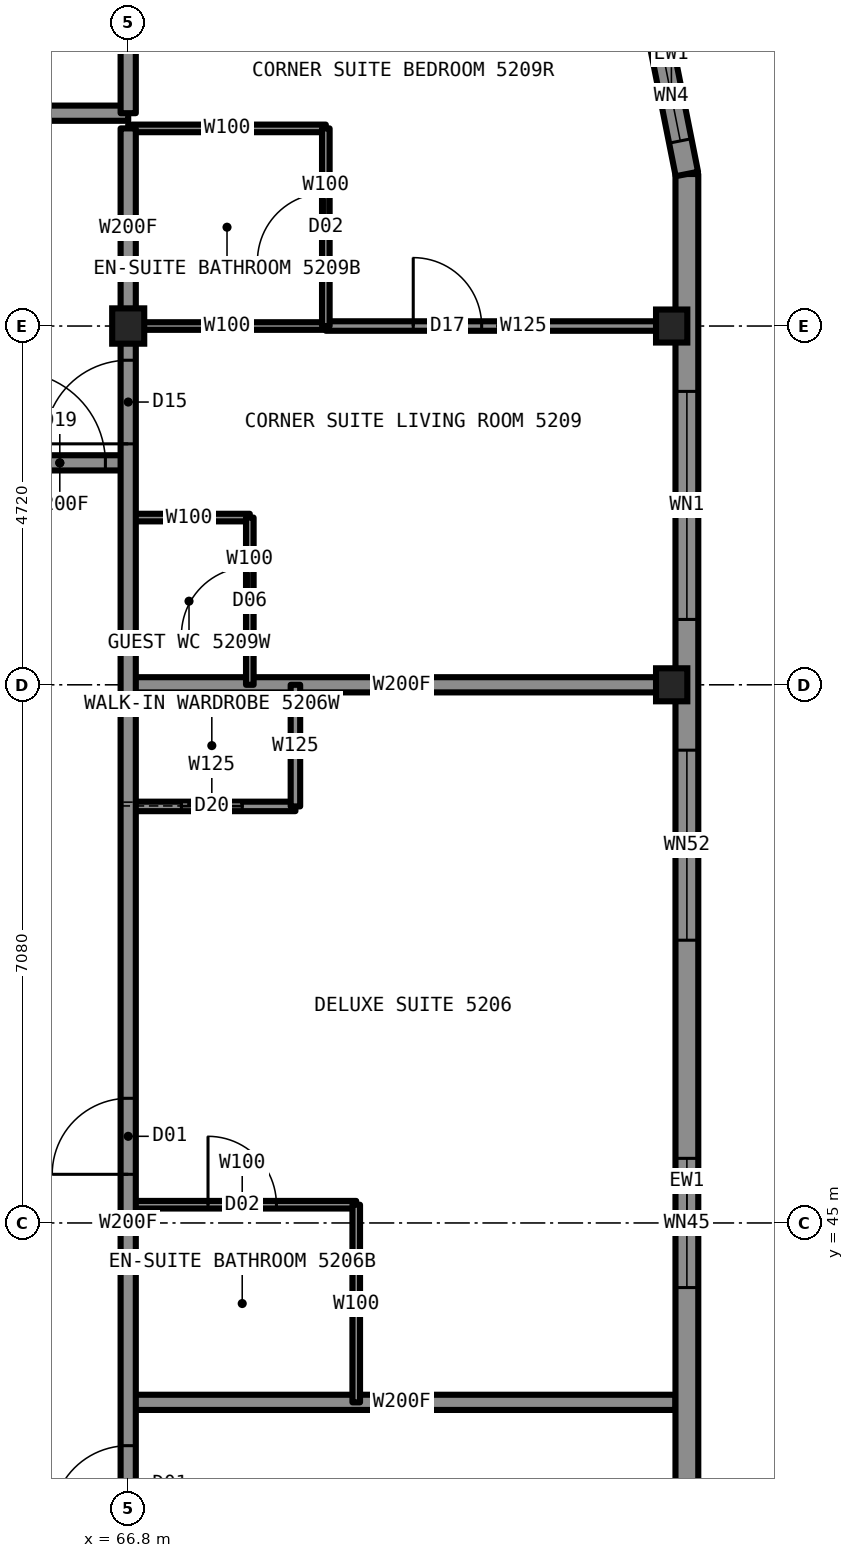
"""IFC4 building model, lengths in metres.
Left out: names, types, materials, properties, quantities, classifications, styles, units other than length and angle.
Written with IfcOpenShell. Run it as: python <this file> out.ifc"""

import sys

from ifc_helpers import new_model, si_unit, direction, frame, frame_2d, origin, origin_2d, place, context, subcontext, project, spatial, rectangle, i_section, extrude, element, fill, save


model = new_model("IFC4")
c1 = context("Model", 3, precision=1e-05, world=origin(), true_north=direction((0.0, 1.0)))
c2 = subcontext(c1, "Body", "Model", "MODEL_VIEW")
j1 = project(units=[si_unit("LENGTHUNIT", "METRE"), si_unit("PLANEANGLEUNIT", "RADIAN")], contexts=[c1])
p1 = place(None, origin())
s1 = spatial("IfcSite", under=j1, at=p1, CompositionType="ELEMENT")
p2 = place(p1, origin())
s2 = spatial("IfcBuilding", under=s1, at=p2, CompositionType="ELEMENT")
p3 = place(p2, frame((0.0, 0.0, 193.3)))
s3 = spatial("IfcBuildingStorey", under=s2, at=p3, CompositionType="ELEMENT", Elevation=193.3)
for number, where, z_axis, x_axis in (
    (1, (73.95, 52.08, 0.0), (0.0, 0.0, 1.0), (1.0, 0.0, 0.0)),
    (2, (73.95, 56.8, 0.0), (0.0, 0.0, 1.0), (1.0, 0.0, 0.0)),
):
    element("IfcColumn", number, at=place(p3, frame(where, z_axis=z_axis, x_axis=x_axis)), inside=s3, PredefinedType="COLUMN", context=c2, shape_type="SweptSolid", body=[
        extrude(i_section(OverallWidth=0.411, OverallDepth=0.434, WebThickness=0.036, FlangeThickness=0.057, at=origin_2d()), origin(), (0.0, 0.0, 1.0), 3.5),
    ])
p4 = place(p3, frame((66.8, 56.8, 0.0), z_axis=(0.0, 0.0, 1.0), x_axis=(1.0, 0.0, 0.0)))
e3 = element("IfcColumn", 3, at=p4, inside=s3, PredefinedType="COLUMN", context=c2, shape_type="SweptSolid", body=[
    extrude(i_section(OverallWidth=0.422, OverallDepth=0.465, WebThickness=0.045, FlangeThickness=0.073, at=origin_2d()), origin(), (0.0, 0.0, 1.0), 3.5),
])
p5 = place(p3, frame((66.8, 42.64, 0.0), z_axis=(0.0, 0.0, 1.0), x_axis=(1.0, 0.0, 0.0)))
e4 = element("IfcWall", 4, at=p5, inside=s3, PredefinedType="PARTITIONING", context=c2, shape_type="SweptSolid", body=[
    extrude(rectangle(XDim=7.2, YDim=0.2, at=frame_2d((3.6, 0.0))), origin(), (0.0, 0.0, 1.0), 2.73),
])
p6 = place(p3, frame((66.8, 45.24, 0.0), z_axis=(0.0, 0.0, 1.0), x_axis=(1.0, 0.0, 0.0)))
e5 = element("IfcWall", 5, at=p6, inside=s3, PredefinedType="PARTITIONING", context=c2, shape_type="SweptSolid", body=[
    extrude(rectangle(XDim=3.0, YDim=0.1, at=frame_2d((1.5, 0.0))), origin(), (0.0, 0.0, 1.0), 3.33),
])
p7 = place(p6, frame((1.05, 0.0, 0.0)))
e6 = element("IfcOpeningElement", 6, at=p7, cuts=e5, PredefinedType="OPENING", context=c2, shape_type="SweptSolid", body=[
    extrude(rectangle(XDim=0.9, YDim=2.1, at=frame_2d((0.45, 1.05))), frame((0.0, 0.06, 0.0), z_axis=(0.0, -1.0, 0.0), x_axis=(1.0, 0.0, 0.0)), (0.0, 0.0, 1.0), 0.12),
])
p8 = place(p3, frame((65.0, 55.0, 0.0), z_axis=(0.0, 0.0, 1.0), x_axis=(1.0, 0.0, 0.0)))
e7 = element("IfcWall", 7, at=p8, inside=s3, PredefinedType="PARTITIONING", context=c2, shape_type="SweptSolid", body=[
    extrude(rectangle(XDim=1.8, YDim=0.2, at=frame_2d((0.9, 0.0))), origin(), (0.0, 0.0, 1.0), 3.33),
])
p9 = place(p8, frame((0.3, 0.0, 0.0)))
e8 = element("IfcOpeningElement", 8, at=p9, cuts=e7, PredefinedType="OPENING", context=c2, shape_type="SweptSolid", body=[
    extrude(rectangle(XDim=1.2, YDim=2.2, at=frame_2d((0.6, 1.1))), frame((0.0, 0.11, 0.0), z_axis=(0.0, -1.0, 0.0), x_axis=(1.0, 0.0, 0.0)), (0.0, 0.0, 1.0), 0.22),
])
p10 = place(p3, frame((66.8, 56.8, 0.0), z_axis=(0.0, 0.0, 1.0), x_axis=(1.0, 0.0, 0.0)))
e9 = element("IfcWall", 9, at=p10, inside=s3, PredefinedType="PARTITIONING", context=c2, shape_type="SweptSolid", body=[
    extrude(rectangle(XDim=2.6, YDim=0.1, at=frame_2d((1.3, 0.0))), origin(), (0.0, 0.0, 1.0), 2.573),
])
p11 = place(p3, frame((69.4, 56.8, 0.0), z_axis=(0.0, 0.0, 1.0), x_axis=(1.0, 0.0, 0.0)))
e10 = element("IfcWall", 10, at=p11, inside=s3, PredefinedType="PARTITIONING", context=c2, shape_type="SweptSolid", body=[
    extrude(rectangle(XDim=4.6, YDim=0.125, at=frame_2d((2.3, 0.0))), origin(), (0.0, 0.0, 1.0), 2.573),
])
p12 = place(p11, frame((1.15, 0.0, 0.0)))
e11 = element("IfcOpeningElement", 11, at=p12, cuts=e10, PredefinedType="OPENING", context=c2, shape_type="SweptSolid", body=[
    extrude(rectangle(XDim=0.9, YDim=2.2, at=frame_2d((0.45, 1.1))), frame((0.0, 0.073, 0.0), z_axis=(0.0, -1.0, 0.0), x_axis=(1.0, 0.0, 0.0)), (0.0, 0.0, 1.0), 0.145),
])
p13 = place(p3, frame((66.8, 59.4, 0.0), z_axis=(0.0, 0.0, 1.0), x_axis=(1.0, 0.0, 0.0)))
e12 = element("IfcWall", 12, at=p13, inside=s3, PredefinedType="PARTITIONING", context=c2, shape_type="SweptSolid", body=[
    extrude(rectangle(XDim=2.6, YDim=0.1, at=frame_2d((1.3, 0.0))), origin(), (0.0, 0.0, 1.0), 3.33),
])
p14 = place(p3, frame((43.2, 59.6, 0.0), z_axis=(0.0, 0.0, 1.0), x_axis=(1.0, 0.0, 0.0)))
e13 = element("IfcWall", 13, at=p14, inside=s3, PredefinedType="PARTITIONING", context=c2, shape_type="SweptSolid", body=[
    extrude(rectangle(XDim=23.6, YDim=0.2, at=frame_2d((11.8, 0.0))), origin(), (0.0, 0.0, 1.0), 3.33),
])
p15 = place(p14, frame((3.0, 0.0, 0.0)))
e14 = element("IfcOpeningElement", 14, at=p15, cuts=e13, PredefinedType="OPENING", context=c2, shape_type="SweptSolid", body=[
    extrude(rectangle(XDim=1.0, YDim=2.2, at=frame_2d((0.5, 1.1))), frame((0.0, 0.11, 0.0), z_axis=(0.0, -1.0, 0.0), x_axis=(1.0, 0.0, 0.0)), (0.0, 0.0, 1.0), 0.22),
])
p16 = place(p14, frame((11.29, 0.0, 0.0)))
e15 = element("IfcOpeningElement", 15, at=p16, cuts=e13, PredefinedType="OPENING", context=c2, shape_type="SweptSolid", body=[
    extrude(rectangle(XDim=1.1, YDim=2.2, at=frame_2d((0.55, 1.1))), frame((0.0, 0.11, 0.0), z_axis=(0.0, -1.0, 0.0), x_axis=(1.0, 0.0, 0.0)), (0.0, 0.0, 1.0), 0.22),
])
p17 = place(p3, frame((66.8, 50.48, 0.0), z_axis=(0.0, 0.0, 1.0), x_axis=(1.0, 0.0, 0.0)))
e16 = element("IfcWall", 16, at=p17, inside=s3, PredefinedType="PARTITIONING", context=c2, shape_type="SweptSolid", body=[
    extrude(rectangle(XDim=2.2, YDim=0.125, at=frame_2d((1.1, 0.0))), origin(), (0.0, 0.0, 1.0), 3.33),
])
p18 = place(p17, frame((0.7, 0.0, 0.0)))
e17 = element("IfcOpeningElement", 17, at=p18, cuts=e16, PredefinedType="OPENING", context=c2, shape_type="SweptSolid", body=[
    extrude(rectangle(XDim=0.8, YDim=2.1, at=frame_2d((0.4, 1.05))), frame((0.0, 0.073, 0.0), z_axis=(0.0, -1.0, 0.0), x_axis=(1.0, 0.0, 0.0)), (0.0, 0.0, 1.0), 0.145),
])
p19 = place(p3, frame((66.8, 52.08, 0.0), z_axis=(0.0, 0.0, 1.0), x_axis=(1.0, 0.0, 0.0)))
e18 = element("IfcWall", 18, at=p19, inside=s3, PredefinedType="PARTITIONING", context=c2, shape_type="SweptSolid", body=[
    extrude(rectangle(XDim=7.2, YDim=0.2, at=frame_2d((3.6, 0.0))), origin(), (0.0, 0.0, 1.0), 2.573),
])
p20 = place(p3, frame((66.8, 54.28, 0.0), z_axis=(0.0, 0.0, 1.0), x_axis=(1.0, 0.0, 0.0)))
e19 = element("IfcWall", 19, at=p20, inside=s3, PredefinedType="PARTITIONING", context=c2, shape_type="SweptSolid", body=[
    extrude(rectangle(XDim=1.6, YDim=0.1, at=frame_2d((0.8, 0.0))), origin(), (0.0, 0.0, 1.0), 3.33),
])
p21 = place(p3, frame((66.8, 33.22, 0.0), z_axis=(0.0, 0.0, 1.0), x_axis=(0.0, 1.0, 0.0)))
e20 = element("IfcWall", 20, at=p21, inside=s3, PredefinedType="PARTITIONING", context=c2, shape_type="SweptSolid", body=[
    extrude(rectangle(XDim=23.56, YDim=0.2, at=frame_2d((11.78, 0.0))), origin(), (0.0, 0.0, 1.0), 3.33),
])
p22 = place(p21, frame((7.85, 0.0, 0.0)))
e21 = element("IfcOpeningElement", 21, at=p22, cuts=e20, PredefinedType="OPENING", context=c2, shape_type="SweptSolid", body=[
    extrude(rectangle(XDim=1.0, YDim=2.2, at=frame_2d((0.5, 1.1))), frame((0.0, 0.11, 0.0), z_axis=(0.0, -1.0, 0.0), x_axis=(1.0, 0.0, 0.0)), (0.0, 0.0, 1.0), 0.22),
])
p23 = place(p21, frame((12.42, 0.0, 0.0)))
e22 = element("IfcOpeningElement", 22, at=p23, cuts=e20, PredefinedType="OPENING", context=c2, shape_type="SweptSolid", body=[
    extrude(rectangle(XDim=1.0, YDim=2.2, at=frame_2d((0.5, 1.1))), frame((0.0, 0.11, 0.0), z_axis=(0.0, -1.0, 0.0), x_axis=(1.0, 0.0, 0.0)), (0.0, 0.0, 1.0), 0.22),
])
p24 = place(p21, frame((22.03, 0.0, 0.0)))
e23 = element("IfcOpeningElement", 23, at=p24, cuts=e20, PredefinedType="OPENING", context=c2, shape_type="SweptSolid", body=[
    extrude(rectangle(XDim=1.1, YDim=2.2, at=frame_2d((0.55, 1.1))), frame((0.0, 0.11, 0.0), z_axis=(0.0, -1.0, 0.0), x_axis=(1.0, 0.0, 0.0)), (0.0, 0.0, 1.0), 0.22),
])
p25 = place(p21, frame((0.63, 0.0, 0.0)))
e24 = element("IfcOpeningElement", 24, at=p25, cuts=e20, PredefinedType="OPENING", context=c2, shape_type="SweptSolid", body=[
    extrude(rectangle(XDim=1.1, YDim=2.2, at=frame_2d((0.55, 1.1))), frame((0.0, 0.11, 0.0), z_axis=(0.0, -1.0, 0.0), x_axis=(1.0, 0.0, 0.0)), (0.0, 0.0, 1.0), 0.22),
])
p26 = place(p3, frame((66.8, 59.6, 0.0), z_axis=(0.0, 0.0, 1.0), x_axis=(0.0, 1.0, 0.0)))
e25 = element("IfcWall", 25, at=p26, inside=s3, PredefinedType="PARTITIONING", context=c2, shape_type="SweptSolid", body=[
    extrude(rectangle(XDim=4.4, YDim=0.2, at=frame_2d((2.2, 0.0))), origin(), (0.0, 0.0, 1.0), 2.573),
])
p27 = place(p3, frame((68.4, 52.08, 0.0), z_axis=(0.0, 0.0, 1.0), x_axis=(0.0, 1.0, 0.0)))
e26 = element("IfcWall", 26, at=p27, inside=s3, PredefinedType="PARTITIONING", context=c2, shape_type="SweptSolid", body=[
    extrude(rectangle(XDim=2.2, YDim=0.1, at=frame_2d((1.1, 0.0))), origin(), (0.0, 0.0, 1.0), 3.33),
])
p28 = place(p27, frame((0.65, 0.0, 0.0)))
e27 = element("IfcOpeningElement", 27, at=p28, cuts=e26, PredefinedType="OPENING", context=c2, shape_type="SweptSolid", body=[
    extrude(rectangle(XDim=0.9, YDim=2.1, at=frame_2d((0.45, 1.05))), frame((0.0, 0.06, 0.0), z_axis=(0.0, -1.0, 0.0), x_axis=(1.0, 0.0, 0.0)), (0.0, 0.0, 1.0), 0.12),
])
p29 = place(p3, frame((69.0, 50.48, 0.0), z_axis=(0.0, 0.0, 1.0), x_axis=(0.0, 1.0, 0.0)))
e28 = element("IfcWall", 28, at=p29, inside=s3, PredefinedType="PARTITIONING", context=c2, shape_type="SweptSolid", body=[
    extrude(rectangle(XDim=1.6, YDim=0.125, at=frame_2d((0.8, 0.0))), origin(), (0.0, 0.0, 1.0), 3.33),
])
p30 = place(p3, frame((69.4, 56.8, 0.0), z_axis=(0.0, 0.0, 1.0), x_axis=(0.0, 1.0, 0.0)))
e29 = element("IfcWall", 29, at=p30, inside=s3, PredefinedType="PARTITIONING", context=c2, shape_type="SweptSolid", body=[
    extrude(rectangle(XDim=2.6, YDim=0.1, at=frame_2d((1.3, 0.0))), origin(), (0.0, 0.0, 1.0), 3.33),
])
p31 = place(p30, frame((0.85, 0.0, 0.0)))
e30 = element("IfcOpeningElement", 30, at=p31, cuts=e29, PredefinedType="OPENING", context=c2, shape_type="SweptSolid", body=[
    extrude(rectangle(XDim=0.9, YDim=2.1, at=frame_2d((0.45, 1.05))), frame((0.0, 0.06, 0.0), z_axis=(0.0, -1.0, 0.0), x_axis=(1.0, 0.0, 0.0)), (0.0, 0.0, 1.0), 0.12),
])
p32 = place(p3, frame((69.8, 42.64, 0.0), z_axis=(0.0, 0.0, 1.0), x_axis=(0.0, 1.0, 0.0)))
e31 = element("IfcWall", 31, at=p32, inside=s3, PredefinedType="PARTITIONING", context=c2, shape_type="SweptSolid", body=[
    extrude(rectangle(XDim=2.6, YDim=0.1, at=frame_2d((1.3, 0.0))), origin(), (0.0, 0.0, 1.0), 3.33),
])
p33 = place(p3, frame((74.15, 31.2, 0.0), z_axis=(0.0, 0.0, 1.0), x_axis=(0.0, 1.0, 0.0)))
e32 = element("IfcWall", 32, at=p33, inside=s3, PredefinedType="SOLIDWALL", context=c2, shape_type="SweptSolid", body=[
    extrude(rectangle(XDim=27.6, YDim=0.3, at=frame_2d((13.8, 0.0))), origin(), (0.0, 0.0, 1.0), 2.83),
])
p34 = place(p33, frame((2.86, 0.0, 0.3)))
e33 = element("IfcOpeningElement", 33, at=p34, cuts=e32, PredefinedType="OPENING", context=c2, shape_type="SweptSolid", body=[
    extrude(rectangle(XDim=3.0, YDim=2.0, at=frame_2d((1.5, 1.0))), frame((0.0, 0.16, 0.0), z_axis=(0.0, -1.0, 0.0), x_axis=(1.0, 0.0, 0.0)), (0.0, 0.0, 1.0), 0.32),
])
p35 = place(p33, frame((7.58, 0.0, 0.3)))
e34 = element("IfcOpeningElement", 34, at=p35, cuts=e32, PredefinedType="OPENING", context=c2, shape_type="SweptSolid", body=[
    extrude(rectangle(XDim=2.5, YDim=2.0, at=frame_2d((1.25, 1.0))), frame((0.0, 0.16, 0.0), z_axis=(0.0, -1.0, 0.0), x_axis=(1.0, 0.0, 0.0)), (0.0, 0.0, 1.0), 0.32),
])
p36 = place(p33, frame((12.95, 0.0, 1.0)))
e35 = element("IfcOpeningElement", 35, at=p36, cuts=e32, PredefinedType="OPENING", context=c2, shape_type="SweptSolid", body=[
    extrude(rectangle(XDim=1.7, YDim=1.3, at=frame_2d((0.85, 0.65))), frame((0.0, 0.16, 0.0), z_axis=(0.0, -1.0, 0.0), x_axis=(1.0, 0.0, 0.0)), (0.0, 0.0, 1.0), 0.32),
])
p37 = place(p33, frame((17.52, 0.0, 0.3)))
e36 = element("IfcOpeningElement", 36, at=p37, cuts=e32, PredefinedType="OPENING", context=c2, shape_type="SweptSolid", body=[
    extrude(rectangle(XDim=2.5, YDim=2.0, at=frame_2d((1.25, 1.0))), frame((0.0, 0.16, 0.0), z_axis=(0.0, -1.0, 0.0), x_axis=(1.0, 0.0, 0.0)), (0.0, 0.0, 1.0), 0.32),
])
p38 = place(p33, frame((21.74, 0.0, 0.3)))
e37 = element("IfcOpeningElement", 37, at=p38, cuts=e32, PredefinedType="OPENING", context=c2, shape_type="SweptSolid", body=[
    extrude(rectangle(XDim=3.0, YDim=2.0, at=frame_2d((1.5, 1.0))), frame((0.0, 0.16, 0.0), z_axis=(0.0, -1.0, 0.0), x_axis=(1.0, 0.0, 0.0)), (0.0, 0.0, 1.0), 0.32),
])
p39 = place(p3, frame((74.15, 58.8, 0.0), z_axis=(0.0, 0.0, 1.0), x_axis=(-0.195081421501, 0.980787050784, 0.0)))
e38 = element("IfcWall", 38, at=p39, inside=s3, PredefinedType="SOLIDWALL", context=c2, shape_type="SweptSolid", body=[
    extrude(rectangle(XDim=2.087, YDim=0.3, at=frame_2d((1.044, 0.0))), origin(), (0.0, 0.0, 1.0), 3.33),
])
p40 = place(p39, frame((0.444, 0.0, 0.3)))
e39 = element("IfcOpeningElement", 39, at=p40, cuts=e38, PredefinedType="OPENING", context=c2, shape_type="SweptSolid", body=[
    extrude(rectangle(XDim=1.2, YDim=2.0, at=frame_2d((0.6, 1.0))), frame((0.0, 0.16, 0.0), z_axis=(0.0, -1.0, 0.0), x_axis=(1.0, 0.0, 0.0)), (0.0, 0.0, 1.0), 0.32),
])
p41 = place(p3, frame((66.8, 56.78, 0.0), z_axis=(0.0, 0.0, 1.0), x_axis=(0.0, 1.0, 0.0)))
e40 = element("IfcWall", 40, at=p41, inside=s3, PredefinedType="PARTITIONING", context=c2, shape_type="SweptSolid", body=[
    extrude(rectangle(XDim=2.62, YDim=0.2, at=frame_2d((1.31, 0.0))), origin(), (0.0, 0.0, 1.0), 2.573),
])
p42 = place(p9, origin())
e41 = element("IfcDoor", 41, at=p42, inside=s3, OperationType="SINGLE_SWING_LEFT", PredefinedType="DOOR", context=c2, shape_type="SweptSolid", body=[
    extrude(rectangle(XDim=1.2, YDim=2.2, at=frame_2d((0.6, 1.1))), frame((0.0, 0.025, 0.0), z_axis=(0.0, -1.0, 0.0), x_axis=(1.0, 0.0, 0.0)), (0.0, 0.0, 1.0), 0.05),
])
fill(e8, e41)
p43 = place(p22, origin())
e42 = element("IfcDoor", 42, at=p43, inside=s3, OperationType="SINGLE_SWING_LEFT", PredefinedType="DOOR", context=c2, shape_type="SweptSolid", body=[
    extrude(rectangle(XDim=1.0, YDim=2.2, at=frame_2d((0.5, 1.1))), frame((0.0, 0.025, 0.0), z_axis=(0.0, -1.0, 0.0), x_axis=(1.0, 0.0, 0.0)), (0.0, 0.0, 1.0), 0.05),
])
fill(e21, e42)
p44 = place(p23, origin())
e43 = element("IfcDoor", 43, at=p44, inside=s3, OperationType="SINGLE_SWING_LEFT", PredefinedType="DOOR", context=c2, shape_type="SweptSolid", body=[
    extrude(rectangle(XDim=1.0, YDim=2.2, at=frame_2d((0.5, 1.1))), frame((0.0, 0.025, 0.0), z_axis=(0.0, -1.0, 0.0), x_axis=(1.0, 0.0, 0.0)), (0.0, 0.0, 1.0), 0.05),
])
fill(e22, e43)
p45 = place(p7, origin())
e44 = element("IfcDoor", 44, at=p45, inside=s3, OperationType="SINGLE_SWING_RIGHT", PredefinedType="DOOR", context=c2, shape_type="SweptSolid", body=[
    extrude(rectangle(XDim=0.9, YDim=2.1, at=frame_2d((0.45, 1.05))), frame((0.0, 0.025, 0.0), z_axis=(0.0, -1.0, 0.0), x_axis=(1.0, 0.0, 0.0)), (0.0, 0.0, 1.0), 0.05),
])
fill(e6, e44)
p46 = place(p18, origin())
e45 = element("IfcDoor", 45, at=p46, inside=s3, OperationType="SLIDING_TO_LEFT", PredefinedType="DOOR", context=c2, shape_type="SweptSolid", body=[
    extrude(rectangle(XDim=0.8, YDim=2.1, at=frame_2d((0.4, 1.05))), frame((0.0, 0.025, 0.0), z_axis=(0.0, -1.0, 0.0), x_axis=(1.0, 0.0, 0.0)), (0.0, 0.0, 1.0), 0.05),
])
fill(e17, e45)
p47 = place(p24, origin())
e46 = element("IfcDoor", 46, at=p47, inside=s3, OperationType="SINGLE_SWING_LEFT", PredefinedType="DOOR", context=c2, shape_type="SweptSolid", body=[
    extrude(rectangle(XDim=1.1, YDim=2.2, at=frame_2d((0.55, 1.1))), frame((0.0, 0.025, 0.0), z_axis=(0.0, -1.0, 0.0), x_axis=(1.0, 0.0, 0.0)), (0.0, 0.0, 1.0), 0.05),
])
fill(e23, e46)
p48 = place(p31, origin())
e47 = element("IfcDoor", 47, at=p48, inside=s3, OperationType="SINGLE_SWING_RIGHT", PredefinedType="DOOR", context=c2, shape_type="SweptSolid", body=[
    extrude(rectangle(XDim=0.9, YDim=2.1, at=frame_2d((0.45, 1.05))), frame((0.0, 0.025, 0.0), z_axis=(0.0, -1.0, 0.0), x_axis=(1.0, 0.0, 0.0)), (0.0, 0.0, 1.0), 0.05),
])
fill(e30, e47)
p49 = place(p12, origin())
e48 = element("IfcDoor", 48, at=p49, inside=s3, OperationType="SINGLE_SWING_LEFT", PredefinedType="DOOR", context=c2, shape_type="SweptSolid", body=[
    extrude(rectangle(XDim=0.9, YDim=2.2, at=frame_2d((0.45, 1.1))), frame((0.0, 0.025, 0.0), z_axis=(0.0, -1.0, 0.0), x_axis=(1.0, 0.0, 0.0)), (0.0, 0.0, 1.0), 0.05),
])
fill(e11, e48)
p50 = place(p28, origin())
e49 = element("IfcDoor", 49, at=p50, inside=s3, OperationType="SINGLE_SWING_LEFT", PredefinedType="DOOR", context=c2, shape_type="SweptSolid", body=[
    extrude(rectangle(XDim=0.9, YDim=2.1, at=frame_2d((0.45, 1.05))), frame((0.0, 0.025, 0.0), z_axis=(0.0, -1.0, 0.0), x_axis=(1.0, 0.0, 0.0)), (0.0, 0.0, 1.0), 0.05),
])
fill(e27, e49)
p51 = place(p36, origin())
e50 = element("IfcWindow", 50, at=p51, inside=s3, PartitioningType="SINGLE_PANEL", PredefinedType="WINDOW", context=c2, shape_type="SweptSolid", body=[
    extrude(rectangle(XDim=1.7, YDim=1.3, at=frame_2d((0.85, 0.65))), frame((0.0, 0.13, 0.0), z_axis=(0.0, -1.0, 0.0), x_axis=(1.0, 0.0, 0.0)), (0.0, 0.0, 1.0), 0.06),
])
fill(e35, e50)
p52 = place(p37, origin())
e51 = element("IfcWindow", 51, at=p52, inside=s3, PartitioningType="SINGLE_PANEL", PredefinedType="WINDOW", context=c2, shape_type="SweptSolid", body=[
    extrude(rectangle(XDim=2.5, YDim=2.0, at=frame_2d((1.25, 1.0))), frame((0.0, 0.13, 0.0), z_axis=(0.0, -1.0, 0.0), x_axis=(1.0, 0.0, 0.0)), (0.0, 0.0, 1.0), 0.06),
])
fill(e36, e51)
p53 = place(p38, origin())
e52 = element("IfcWindow", 52, at=p53, inside=s3, PartitioningType="SINGLE_PANEL", PredefinedType="WINDOW", context=c2, shape_type="SweptSolid", body=[
    extrude(rectangle(XDim=3.0, YDim=2.0, at=frame_2d((1.5, 1.0))), frame((0.0, 0.13, 0.0), z_axis=(0.0, -1.0, 0.0), x_axis=(1.0, 0.0, 0.0)), (0.0, 0.0, 1.0), 0.06),
])
fill(e37, e52)
p54 = place(p40, origin())
e53 = element("IfcWindow", 53, at=p54, inside=s3, PartitioningType="SINGLE_PANEL", PredefinedType="WINDOW", context=c2, shape_type="SweptSolid", body=[
    extrude(rectangle(XDim=1.2, YDim=2.0, at=frame_2d((0.6, 1.0))), frame((0.0, 0.13, 0.0), z_axis=(0.0, -1.0, 0.0), x_axis=(1.0, 0.0, 0.0)), (0.0, 0.0, 1.0), 0.06),
])
fill(e39, e53)
save(model, sys.argv[1])
